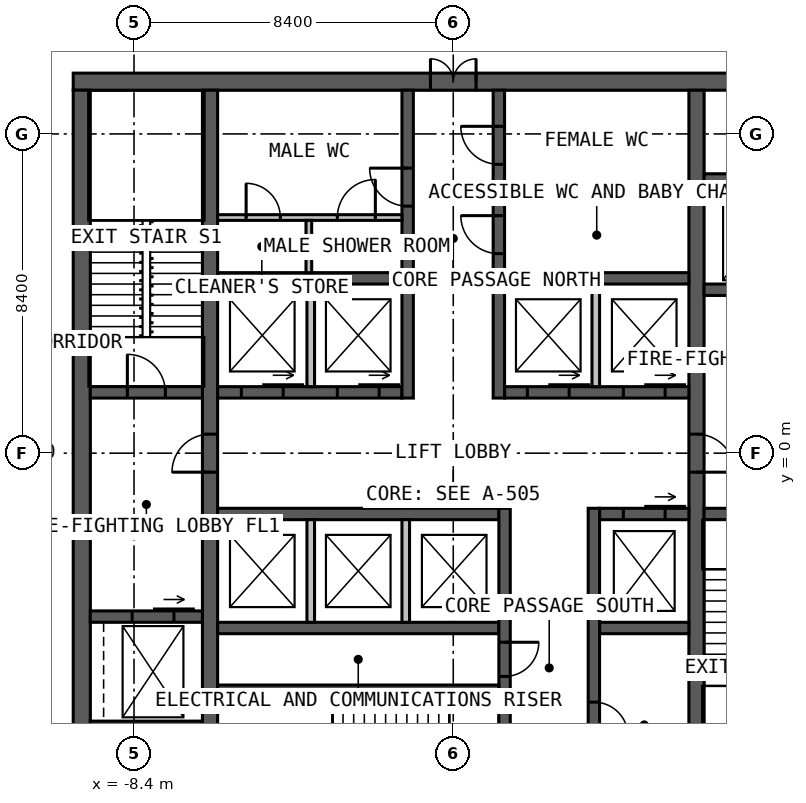
"""IFC4 building model, lengths in metres.
Left out: names, types, materials, properties, quantities, classifications, styles, units other than length and angle.
Written with IfcOpenShell. Run it as: python <this file> out.ifc"""

import sys

from ifc_helpers import new_model, si_unit, direction, frame, frame_2d, origin, place, context, subcontext, project, spatial, rectangle, extrude, element, fill, save


model = new_model("IFC4")
c1 = context("Model", 3, precision=1e-05, world=origin(), true_north=direction((0.0, 1.0)))
c2 = subcontext(c1, "Body", "Model", "MODEL_VIEW")
j1 = project(units=[si_unit("LENGTHUNIT", "METRE"), si_unit("PLANEANGLEUNIT", "RADIAN")], contexts=[c1])
p1 = place(None, origin())
s1 = spatial("IfcSite", under=j1, at=p1, CompositionType="ELEMENT")
p2 = place(p1, origin())
s2 = spatial("IfcBuilding", under=s1, at=p2, CompositionType="ELEMENT")
p3 = place(p2, frame((0.0, 0.0, 203.0)))
s3 = spatial("IfcBuildingStorey", under=s2, at=p3, CompositionType="ELEMENT", Elevation=203.0)
p4 = place(p3, frame((-10.0, 9.775, 0.0), z_axis=(0.0, 0.0, 1.0), x_axis=(1.0, 0.0, 0.0)))
e1 = element("IfcWall", 1, at=p4, inside=s3, PredefinedType="SOLIDWALL", context=c2, shape_type="SweptSolid", body=[
    extrude(rectangle(XDim=20.0, YDim=0.45, at=frame_2d((10.0, 0.0))), origin(), (0.0, 0.0, 1.0), 4.0),
])
p5 = place(p4, frame((9.4, 0.0, 0.0)))
e2 = element("IfcOpeningElement", 2, at=p5, cuts=e1, PredefinedType="OPENING", context=c2, shape_type="SweptSolid", body=[
    extrude(rectangle(XDim=1.2, YDim=2.2, at=frame_2d((0.6, 1.1))), frame((0.0, 0.235, 0.0), z_axis=(0.0, -1.0, 0.0), x_axis=(1.0, 0.0, 0.0)), (0.0, 0.0, 1.0), 0.47),
])
p6 = place(p3, frame((-9.775, 9.55, 0.0), z_axis=(0.0, 0.0, 1.0), x_axis=(0.0, -1.0, 0.0)))
e3 = element("IfcWall", 3, at=p6, inside=s3, PredefinedType="SOLIDWALL", context=c2, shape_type="SweptSolid", body=[
    extrude(rectangle(XDim=19.1, YDim=0.45, at=frame_2d((9.55, 0.0))), origin(), (0.0, 0.0, 1.0), 4.0),
])
p7 = place(p3, frame((-6.4, -9.55, 0.0), z_axis=(0.0, 0.0, 1.0), x_axis=(0.0, 1.0, 0.0)))
e4 = element("IfcWall", 4, at=p7, inside=s3, PredefinedType="SOLIDWALL", context=c2, shape_type="SweptSolid", body=[
    extrude(rectangle(XDim=19.1, YDim=0.4, at=frame_2d((9.55, 0.0))), origin(), (0.0, 0.0, 1.0), 4.0),
])
p8 = place(p7, frame((9.05, 0.0, 0.0)))
e5 = element("IfcOpeningElement", 5, at=p8, cuts=e4, PredefinedType="OPENING", context=c2, shape_type="SweptSolid", body=[
    extrude(rectangle(XDim=1.0, YDim=2.2, at=frame_2d((0.5, 1.1))), frame((0.0, 0.21, 0.0), z_axis=(0.0, -1.0, 0.0), x_axis=(1.0, 0.0, 0.0)), (0.0, 0.0, 1.0), 0.42),
])
p9 = place(p3, frame((6.4, 9.55, 0.0), z_axis=(0.0, 0.0, 1.0), x_axis=(0.0, -1.0, 0.0)))
e6 = element("IfcWall", 6, at=p9, inside=s3, PredefinedType="SOLIDWALL", context=c2, shape_type="SweptSolid", body=[
    extrude(rectangle(XDim=19.1, YDim=0.4, at=frame_2d((9.55, 0.0))), origin(), (0.0, 0.0, 1.0), 4.0),
])
p10 = place(p9, frame((9.05, 0.0, 0.0)))
e7 = element("IfcOpeningElement", 7, at=p10, cuts=e6, PredefinedType="OPENING", context=c2, shape_type="SweptSolid", body=[
    extrude(rectangle(XDim=1.0, YDim=2.2, at=frame_2d((0.5, 1.1))), frame((0.0, 0.21, 0.0), z_axis=(0.0, -1.0, 0.0), x_axis=(1.0, 0.0, 0.0)), (0.0, 0.0, 1.0), 0.42),
])
p11 = place(p3, frame((-6.2, 1.6, 0.0), z_axis=(0.0, 0.0, 1.0), x_axis=(1.0, 0.0, 0.0)))
e8 = element("IfcWall", 8, at=p11, inside=s3, PredefinedType="SOLIDWALL", context=c2, shape_type="SweptSolid", body=[
    extrude(rectangle(XDim=4.85, YDim=0.3, at=frame_2d((2.425, 0.0))), origin(), (0.0, 0.0, 1.0), 4.0),
])
p12 = place(p11, frame((0.625, 0.0, 0.0)))
e9 = element("IfcOpeningElement", 9, at=p12, cuts=e8, PredefinedType="OPENING", context=c2, shape_type="SweptSolid", body=[
    extrude(rectangle(XDim=1.1, YDim=2.2, at=frame_2d((0.55, 1.1))), frame((0.0, 0.16, 0.0), z_axis=(0.0, -1.0, 0.0), x_axis=(1.0, 0.0, 0.0)), (0.0, 0.0, 1.0), 0.32),
])
p13 = place(p11, frame((3.15, 0.0, 0.0)))
e10 = element("IfcOpeningElement", 10, at=p13, cuts=e8, PredefinedType="OPENING", context=c2, shape_type="SweptSolid", body=[
    extrude(rectangle(XDim=1.1, YDim=2.2, at=frame_2d((0.55, 1.1))), frame((0.0, 0.16, 0.0), z_axis=(0.0, -1.0, 0.0), x_axis=(1.0, 0.0, 0.0)), (0.0, 0.0, 1.0), 0.32),
])
p14 = place(p3, frame((1.35, 1.6, 0.0), z_axis=(0.0, 0.0, 1.0), x_axis=(1.0, 0.0, 0.0)))
e11 = element("IfcWall", 11, at=p14, inside=s3, PredefinedType="SOLIDWALL", context=c2, shape_type="SweptSolid", body=[
    extrude(rectangle(XDim=4.85, YDim=0.3, at=frame_2d((2.425, 0.0))), origin(), (0.0, 0.0, 1.0), 4.0),
])
p15 = place(p14, frame((0.6, 0.0, 0.0)))
e12 = element("IfcOpeningElement", 12, at=p15, cuts=e11, PredefinedType="OPENING", context=c2, shape_type="SweptSolid", body=[
    extrude(rectangle(XDim=1.1, YDim=2.2, at=frame_2d((0.55, 1.1))), frame((0.0, 0.16, 0.0), z_axis=(0.0, -1.0, 0.0), x_axis=(1.0, 0.0, 0.0)), (0.0, 0.0, 1.0), 0.32),
])
p16 = place(p14, frame((3.125, 0.0, 0.0)))
e13 = element("IfcOpeningElement", 13, at=p16, cuts=e11, PredefinedType="OPENING", context=c2, shape_type="SweptSolid", body=[
    extrude(rectangle(XDim=1.1, YDim=2.2, at=frame_2d((0.55, 1.1))), frame((0.0, 0.16, 0.0), z_axis=(0.0, -1.0, 0.0), x_axis=(1.0, 0.0, 0.0)), (0.0, 0.0, 1.0), 0.32),
])
for number, where, z_axis, x_axis in (
    (14, (-6.2, 4.6, 0.0), (0.0, 0.0, 1.0), (1.0, 0.0, 0.0)),
    (15, (1.35, 4.6, 0.0), (0.0, 0.0, 1.0), (1.0, 0.0, 0.0)),
):
    element("IfcWall", number, at=place(p3, frame(where, z_axis=z_axis, x_axis=x_axis)), inside=s3, PredefinedType="SOLIDWALL", context=c2, shape_type="SweptSolid", body=[
        extrude(rectangle(XDim=4.85, YDim=0.3, at=frame_2d((2.425, 0.0))), origin(), (0.0, 0.0, 1.0), 4.0),
    ])
p17 = place(p3, frame((-1.2, 1.45, 0.0), z_axis=(0.0, 0.0, 1.0), x_axis=(0.0, 1.0, 0.0)))
e16 = element("IfcWall", 16, at=p17, inside=s3, PredefinedType="SOLIDWALL", context=c2, shape_type="SweptSolid", body=[
    extrude(rectangle(XDim=8.1, YDim=0.3, at=frame_2d((4.05, 0.0))), origin(), (0.0, 0.0, 1.0), 4.0),
])
p18 = place(p17, frame((5.05, 0.0, 0.0)))
e17 = element("IfcOpeningElement", 17, at=p18, cuts=e16, PredefinedType="OPENING", context=c2, shape_type="SweptSolid", body=[
    extrude(rectangle(XDim=1.0, YDim=2.2, at=frame_2d((0.5, 1.1))), frame((0.0, 0.16, 0.0), z_axis=(0.0, -1.0, 0.0), x_axis=(1.0, 0.0, 0.0)), (0.0, 0.0, 1.0), 0.32),
])
p19 = place(p3, frame((1.2, 1.45, 0.0), z_axis=(0.0, 0.0, 1.0), x_axis=(0.0, 1.0, 0.0)))
e18 = element("IfcWall", 18, at=p19, inside=s3, PredefinedType="SOLIDWALL", context=c2, shape_type="SweptSolid", body=[
    extrude(rectangle(XDim=8.1, YDim=0.3, at=frame_2d((4.05, 0.0))), origin(), (0.0, 0.0, 1.0), 4.0),
])
p20 = place(p19, frame((3.8, 0.0, 0.0)))
e19 = element("IfcOpeningElement", 19, at=p20, cuts=e18, PredefinedType="OPENING", context=c2, shape_type="SweptSolid", body=[
    extrude(rectangle(XDim=1.0, YDim=2.2, at=frame_2d((0.5, 1.1))), frame((0.0, 0.16, 0.0), z_axis=(0.0, -1.0, 0.0), x_axis=(1.0, 0.0, 0.0)), (0.0, 0.0, 1.0), 0.32),
])
p21 = place(p19, frame((6.15, 0.0, 0.0)))
e20 = element("IfcOpeningElement", 20, at=p21, cuts=e18, PredefinedType="OPENING", context=c2, shape_type="SweptSolid", body=[
    extrude(rectangle(XDim=1.0, YDim=2.2, at=frame_2d((0.5, 1.1))), frame((0.0, 0.16, 0.0), z_axis=(0.0, -1.0, 0.0), x_axis=(1.0, 0.0, 0.0)), (0.0, 0.0, 1.0), 0.32),
])
p22 = place(p3, frame((-6.2, -1.6, 0.0), z_axis=(0.0, 0.0, 1.0), x_axis=(1.0, 0.0, 0.0)))
e21 = element("IfcWall", 21, at=p22, inside=s3, PredefinedType="SOLIDWALL", context=c2, shape_type="SweptSolid", body=[
    extrude(rectangle(XDim=7.4, YDim=0.3, at=frame_2d((3.7, 0.0))), origin(), (0.0, 0.0, 1.0), 4.0),
])
p23 = place(p3, frame((3.85, -1.6, 0.0), z_axis=(0.0, 0.0, 1.0), x_axis=(1.0, 0.0, 0.0)))
e22 = element("IfcWall", 22, at=p23, inside=s3, PredefinedType="SOLIDWALL", context=c2, shape_type="SweptSolid", body=[
    extrude(rectangle(XDim=2.35, YDim=0.3, at=frame_2d((1.175, 0.0))), origin(), (0.0, 0.0, 1.0), 4.0),
])
p24 = place(p23, frame((0.625, 0.0, 0.0)))
e23 = element("IfcOpeningElement", 23, at=p24, cuts=e22, PredefinedType="OPENING", context=c2, shape_type="SweptSolid", body=[
    extrude(rectangle(XDim=1.1, YDim=2.2, at=frame_2d((0.55, 1.1))), frame((0.0, 0.16, 0.0), z_axis=(0.0, -1.0, 0.0), x_axis=(1.0, 0.0, 0.0)), (0.0, 0.0, 1.0), 0.32),
])
p25 = place(p3, frame((-6.2, -4.6, 0.0), z_axis=(0.0, 0.0, 1.0), x_axis=(1.0, 0.0, 0.0)))
e24 = element("IfcWall", 24, at=p25, inside=s3, PredefinedType="SOLIDWALL", context=c2, shape_type="SweptSolid", body=[
    extrude(rectangle(XDim=7.4, YDim=0.3, at=frame_2d((3.7, 0.0))), origin(), (0.0, 0.0, 1.0), 4.0),
])
p26 = place(p3, frame((3.85, -4.6, 0.0), z_axis=(0.0, 0.0, 1.0), x_axis=(1.0, 0.0, 0.0)))
e25 = element("IfcWall", 25, at=p26, inside=s3, PredefinedType="SOLIDWALL", context=c2, shape_type="SweptSolid", body=[
    extrude(rectangle(XDim=2.35, YDim=0.3, at=frame_2d((1.175, 0.0))), origin(), (0.0, 0.0, 1.0), 4.0),
])
p27 = place(p3, frame((1.35, -1.45, 0.0), z_axis=(0.0, 0.0, 1.0), x_axis=(0.0, -1.0, 0.0)))
e26 = element("IfcWall", 26, at=p27, inside=s3, PredefinedType="SOLIDWALL", context=c2, shape_type="SweptSolid", body=[
    extrude(rectangle(XDim=8.1, YDim=0.3, at=frame_2d((4.05, 0.0))), origin(), (0.0, 0.0, 1.0), 4.0),
])
p28 = place(p27, frame((5.975, 0.0, 0.0)))
e27 = element("IfcOpeningElement", 27, at=p28, cuts=e26, PredefinedType="OPENING", context=c2, shape_type="SweptSolid", body=[
    extrude(rectangle(XDim=1.0, YDim=2.2, at=frame_2d((0.5, 1.1))), frame((0.0, 0.16, 0.0), z_axis=(0.0, -1.0, 0.0), x_axis=(1.0, 0.0, 0.0)), (0.0, 0.0, 1.0), 0.32),
])
p29 = place(p27, frame((3.525, 0.0, 0.0)))
e28 = element("IfcOpeningElement", 28, at=p29, cuts=e26, PredefinedType="OPENING", context=c2, shape_type="SweptSolid", body=[
    extrude(rectangle(XDim=0.9, YDim=2.2, at=frame_2d((0.45, 1.1))), frame((0.0, 0.16, 0.0), z_axis=(0.0, -1.0, 0.0), x_axis=(1.0, 0.0, 0.0)), (0.0, 0.0, 1.0), 0.32),
])
p30 = place(p3, frame((3.7, -1.45, 0.0), z_axis=(0.0, 0.0, 1.0), x_axis=(0.0, -1.0, 0.0)))
e29 = element("IfcWall", 29, at=p30, inside=s3, PredefinedType="SOLIDWALL", context=c2, shape_type="SweptSolid", body=[
    extrude(rectangle(XDim=8.1, YDim=0.3, at=frame_2d((4.05, 0.0))), origin(), (0.0, 0.0, 1.0), 4.0),
])
p31 = place(p30, frame((5.1, 0.0, 0.0)))
e30 = element("IfcOpeningElement", 30, at=p31, cuts=e29, PredefinedType="OPENING", context=c2, shape_type="SweptSolid", body=[
    extrude(rectangle(XDim=0.9, YDim=2.2, at=frame_2d((0.45, 1.1))), frame((0.0, 0.16, 0.0), z_axis=(0.0, -1.0, 0.0), x_axis=(1.0, 0.0, 0.0)), (0.0, 0.0, 1.0), 0.32),
])
p32 = place(p3, frame((-6.2, -6.2, 0.0), z_axis=(0.0, 0.0, 1.0), x_axis=(1.0, 0.0, 0.0)))
e31 = element("IfcWall", 31, at=p32, inside=s3, PredefinedType="SOLIDWALL", context=c2, shape_type="SweptSolid", body=[
    extrude(rectangle(XDim=7.4, YDim=0.2, at=frame_2d((3.7, 0.0))), origin(), (0.0, 0.0, 1.0), 4.0),
])
p33 = place(p3, frame((-9.55, 1.6, 0.0), z_axis=(0.0, 0.0, 1.0), x_axis=(1.0, 0.0, 0.0)))
e32 = element("IfcWall", 32, at=p33, inside=s3, PredefinedType="SOLIDWALL", context=c2, shape_type="SweptSolid", body=[
    extrude(rectangle(XDim=2.95, YDim=0.3, at=frame_2d((1.475, 0.0))), origin(), (0.0, 0.0, 1.0), 4.0),
])
p34 = place(p33, frame((0.975, 0.0, 0.0)))
e33 = element("IfcOpeningElement", 33, at=p34, cuts=e32, PredefinedType="OPENING", context=c2, shape_type="SweptSolid", body=[
    extrude(rectangle(XDim=1.0, YDim=2.2, at=frame_2d((0.5, 1.1))), frame((0.0, 0.16, 0.0), z_axis=(0.0, -1.0, 0.0), x_axis=(1.0, 0.0, 0.0)), (0.0, 0.0, 1.0), 0.32),
])
p35 = place(p3, frame((6.6, -1.6, 0.0), z_axis=(0.0, 0.0, 1.0), x_axis=(1.0, 0.0, 0.0)))
e34 = element("IfcWall", 34, at=p35, inside=s3, PredefinedType="SOLIDWALL", context=c2, shape_type="SweptSolid", body=[
    extrude(rectangle(XDim=2.95, YDim=0.3, at=frame_2d((1.475, 0.0))), origin(), (0.0, 0.0, 1.0), 4.0),
])
p36 = place(p35, frame((0.975, 0.0, 0.0)))
e35 = element("IfcOpeningElement", 35, at=p36, cuts=e34, PredefinedType="OPENING", context=c2, shape_type="SweptSolid", body=[
    extrude(rectangle(XDim=1.0, YDim=2.2, at=frame_2d((0.5, 1.1))), frame((0.0, 0.16, 0.0), z_axis=(0.0, -1.0, 0.0), x_axis=(1.0, 0.0, 0.0)), (0.0, 0.0, 1.0), 0.32),
])
p37 = place(p3, frame((-9.55, -4.3, 0.0), z_axis=(0.0, 0.0, 1.0), x_axis=(1.0, 0.0, 0.0)))
e36 = element("IfcWall", 36, at=p37, inside=s3, PredefinedType="SOLIDWALL", context=c2, shape_type="SweptSolid", body=[
    extrude(rectangle(XDim=2.95, YDim=0.3, at=frame_2d((1.475, 0.0))), origin(), (0.0, 0.0, 1.0), 4.0),
])
p38 = place(p37, frame((1.1, 0.0, 0.0)))
e37 = element("IfcOpeningElement", 37, at=p38, cuts=e36, PredefinedType="OPENING", context=c2, shape_type="SweptSolid", body=[
    extrude(rectangle(XDim=1.1, YDim=2.2, at=frame_2d((0.55, 1.1))), frame((0.0, 0.16, 0.0), z_axis=(0.0, -1.0, 0.0), x_axis=(1.0, 0.0, 0.0)), (0.0, 0.0, 1.0), 0.32),
])
p39 = place(p3, frame((6.6, 4.3, 0.0), z_axis=(0.0, 0.0, 1.0), x_axis=(1.0, 0.0, 0.0)))
e38 = element("IfcWall", 38, at=p39, inside=s3, PredefinedType="SOLIDWALL", context=c2, shape_type="SweptSolid", body=[
    extrude(rectangle(XDim=2.95, YDim=0.3, at=frame_2d((1.475, 0.0))), origin(), (0.0, 0.0, 1.0), 4.0),
])
p40 = place(p39, frame((0.75, 0.0, 0.0)))
e39 = element("IfcOpeningElement", 39, at=p40, cuts=e38, PredefinedType="OPENING", context=c2, shape_type="SweptSolid", body=[
    extrude(rectangle(XDim=1.1, YDim=2.2, at=frame_2d((0.55, 1.1))), frame((0.0, 0.16, 0.0), z_axis=(0.0, -1.0, 0.0), x_axis=(1.0, 0.0, 0.0)), (0.0, 0.0, 1.0), 0.32),
])
for number, where, z_axis, x_axis in (
    (40, (-9.55, -7.2, 0.0), (0.0, 0.0, 1.0), (1.0, 0.0, 0.0)),
    (41, (6.6, 7.2, 0.0), (0.0, 0.0, 1.0), (1.0, 0.0, 0.0)),
):
    element("IfcWall", number, at=place(p3, frame(where, z_axis=z_axis, x_axis=x_axis)), inside=s3, PredefinedType="SOLIDWALL", context=c2, shape_type="SweptSolid", body=[
        extrude(rectangle(XDim=2.95, YDim=0.3, at=frame_2d((1.475, 0.0))), origin(), (0.0, 0.0, 1.0), 4.0),
    ])
for number, where, z_axis, x_axis in (
    (42, (-3.75, 1.75, 0.0), (0.0, 0.0, 1.0), (0.0, 1.0, 0.0)),
    (43, (3.75, 1.75, 0.0), (0.0, 0.0, 1.0), (0.0, 1.0, 0.0)),
    (44, (-3.75, -1.75, 0.0), (0.0, 0.0, 1.0), (0.0, -1.0, 0.0)),
    (45, (-1.25, -1.75, 0.0), (0.0, 0.0, 1.0), (0.0, -1.0, 0.0)),
):
    element("IfcWall", number, at=place(p3, frame(where, z_axis=z_axis, x_axis=x_axis)), inside=s3, PredefinedType="SOLIDWALL", context=c2, shape_type="SweptSolid", body=[
        extrude(rectangle(XDim=2.7, YDim=0.2, at=frame_2d((1.35, 0.0))), origin(), (0.0, 0.0, 1.0), 3.75),
    ])
p41 = place(p3, frame((1.35, 6.8, 0.0), z_axis=(0.0, 0.0, 1.0), x_axis=(1.0, 0.0, 0.0)))
e46 = element("IfcWall", 46, at=p41, inside=s3, PredefinedType="PARTITIONING", context=c2, shape_type="SweptSolid", body=[
    extrude(rectangle(XDim=4.85, YDim=0.15, at=frame_2d((2.425, 0.0))), origin(), (0.0, 0.0, 1.0), 3.75),
])
p42 = place(p3, frame((-6.2, 6.2, 0.0), z_axis=(0.0, 0.0, 1.0), x_axis=(1.0, 0.0, 0.0)))
e47 = element("IfcWall", 47, at=p42, inside=s3, PredefinedType="PARTITIONING", context=c2, shape_type="SweptSolid", body=[
    extrude(rectangle(XDim=4.85, YDim=0.15, at=frame_2d((2.425, 0.0))), origin(), (0.0, 0.0, 1.0), 3.75),
])
p43 = place(p42, frame((3.15, 0.0, 0.0)))
e48 = element("IfcOpeningElement", 48, at=p43, cuts=e47, PredefinedType="OPENING", context=c2, shape_type="SweptSolid", body=[
    extrude(rectangle(XDim=1.0, YDim=2.2, at=frame_2d((0.5, 1.1))), frame((0.0, 0.085, 0.0), z_axis=(0.0, -1.0, 0.0), x_axis=(1.0, 0.0, 0.0)), (0.0, 0.0, 1.0), 0.17),
])
p44 = place(p42, frame((0.75, 0.0, 0.0)))
e49 = element("IfcOpeningElement", 49, at=p44, cuts=e47, PredefinedType="OPENING", context=c2, shape_type="SweptSolid", body=[
    extrude(rectangle(XDim=0.9, YDim=2.2, at=frame_2d((0.45, 1.1))), frame((0.0, 0.085, 0.0), z_axis=(0.0, -1.0, 0.0), x_axis=(1.0, 0.0, 0.0)), (0.0, 0.0, 1.0), 0.17),
])
p45 = place(p3, frame((-3.8, 4.75, 0.0), z_axis=(0.0, 0.0, 1.0), x_axis=(0.0, 1.0, 0.0)))
e50 = element("IfcWall", 50, at=p45, inside=s3, PredefinedType="PARTITIONING", context=c2, shape_type="SweptSolid", body=[
    extrude(rectangle(XDim=1.375, YDim=0.15, at=frame_2d((0.688, 0.0))), origin(), (0.0, 0.0, 1.0), 3.75),
])
p46 = place(p5, origin())
e51 = element("IfcDoor", 51, at=p46, inside=s3, OperationType="DOUBLE_DOOR_SINGLE_SWING", PredefinedType="DOOR", context=c2, shape_type="SweptSolid", body=[
    extrude(rectangle(XDim=1.2, YDim=2.2, at=frame_2d((0.6, 1.1))), frame((0.0, 0.025, 0.0), z_axis=(0.0, -1.0, 0.0), x_axis=(1.0, 0.0, 0.0)), (0.0, 0.0, 1.0), 0.05),
])
fill(e2, e51)
p47 = place(p8, origin())
e52 = element("IfcDoor", 52, at=p47, inside=s3, OperationType="SINGLE_SWING_LEFT", PredefinedType="DOOR", context=c2, shape_type="SweptSolid", body=[
    extrude(rectangle(XDim=1.0, YDim=2.2, at=frame_2d((0.5, 1.1))), frame((0.0, 0.025, 0.0), z_axis=(0.0, -1.0, 0.0), x_axis=(1.0, 0.0, 0.0)), (0.0, 0.0, 1.0), 0.05),
])
fill(e5, e52)
p48 = place(p10, origin())
e53 = element("IfcDoor", 53, at=p48, inside=s3, OperationType="SINGLE_SWING_RIGHT", PredefinedType="DOOR", context=c2, shape_type="SweptSolid", body=[
    extrude(rectangle(XDim=1.0, YDim=2.2, at=frame_2d((0.5, 1.1))), frame((0.0, 0.025, 0.0), z_axis=(0.0, -1.0, 0.0), x_axis=(1.0, 0.0, 0.0)), (0.0, 0.0, 1.0), 0.05),
])
fill(e7, e53)
p49 = place(p34, origin())
e54 = element("IfcDoor", 54, at=p49, inside=s3, OperationType="SINGLE_SWING_LEFT", PredefinedType="DOOR", context=c2, shape_type="SweptSolid", body=[
    extrude(rectangle(XDim=1.0, YDim=2.2, at=frame_2d((0.5, 1.1))), frame((0.0, 0.025, 0.0), z_axis=(0.0, -1.0, 0.0), x_axis=(1.0, 0.0, 0.0)), (0.0, 0.0, 1.0), 0.05),
])
fill(e33, e54)
p50 = place(p18, origin())
e55 = element("IfcDoor", 55, at=p50, inside=s3, OperationType="SINGLE_SWING_RIGHT", PredefinedType="DOOR", context=c2, shape_type="SweptSolid", body=[
    extrude(rectangle(XDim=1.0, YDim=2.2, at=frame_2d((0.5, 1.1))), frame((0.0, 0.025, 0.0), z_axis=(0.0, -1.0, 0.0), x_axis=(1.0, 0.0, 0.0)), (0.0, 0.0, 1.0), 0.05),
])
fill(e17, e55)
p51 = place(p20, origin())
e56 = element("IfcDoor", 56, at=p51, inside=s3, OperationType="SINGLE_SWING_RIGHT", PredefinedType="DOOR", context=c2, shape_type="SweptSolid", body=[
    extrude(rectangle(XDim=1.0, YDim=2.2, at=frame_2d((0.5, 1.1))), frame((0.0, 0.025, 0.0), z_axis=(0.0, -1.0, 0.0), x_axis=(1.0, 0.0, 0.0)), (0.0, 0.0, 1.0), 0.05),
])
fill(e19, e56)
p52 = place(p21, origin())
e57 = element("IfcDoor", 57, at=p52, inside=s3, OperationType="SINGLE_SWING_RIGHT", PredefinedType="DOOR", context=c2, shape_type="SweptSolid", body=[
    extrude(rectangle(XDim=1.0, YDim=2.2, at=frame_2d((0.5, 1.1))), frame((0.0, 0.025, 0.0), z_axis=(0.0, -1.0, 0.0), x_axis=(1.0, 0.0, 0.0)), (0.0, 0.0, 1.0), 0.05),
])
fill(e20, e57)
p53 = place(p29, origin())
e58 = element("IfcDoor", 58, at=p53, inside=s3, OperationType="SINGLE_SWING_LEFT", PredefinedType="DOOR", context=c2, shape_type="SweptSolid", body=[
    extrude(rectangle(XDim=0.9, YDim=2.2, at=frame_2d((0.45, 1.1))), frame((0.0, 0.025, 0.0), z_axis=(0.0, -1.0, 0.0), x_axis=(1.0, 0.0, 0.0)), (0.0, 0.0, 1.0), 0.05),
])
fill(e28, e58)
p54 = place(p31, origin())
e59 = element("IfcDoor", 59, at=p54, inside=s3, OperationType="SINGLE_SWING_RIGHT", PredefinedType="DOOR", context=c2, shape_type="SweptSolid", body=[
    extrude(rectangle(XDim=0.9, YDim=2.2, at=frame_2d((0.45, 1.1))), frame((0.0, 0.025, 0.0), z_axis=(0.0, -1.0, 0.0), x_axis=(1.0, 0.0, 0.0)), (0.0, 0.0, 1.0), 0.05),
])
fill(e30, e59)
p55 = place(p43, origin())
e60 = element("IfcDoor", 60, at=p55, inside=s3, OperationType="SINGLE_SWING_RIGHT", PredefinedType="DOOR", context=c2, shape_type="SweptSolid", body=[
    extrude(rectangle(XDim=1.0, YDim=2.2, at=frame_2d((0.5, 1.1))), frame((0.0, 0.025, 0.0), z_axis=(0.0, -1.0, 0.0), x_axis=(1.0, 0.0, 0.0)), (0.0, 0.0, 1.0), 0.05),
])
fill(e48, e60)
p56 = place(p44, origin())
e61 = element("IfcDoor", 61, at=p56, inside=s3, OperationType="SINGLE_SWING_LEFT", PredefinedType="DOOR", context=c2, shape_type="SweptSolid", body=[
    extrude(rectangle(XDim=0.9, YDim=2.2, at=frame_2d((0.45, 1.1))), frame((0.0, 0.025, 0.0), z_axis=(0.0, -1.0, 0.0), x_axis=(1.0, 0.0, 0.0)), (0.0, 0.0, 1.0), 0.05),
])
fill(e49, e61)
p57 = place(p12, origin())
e62 = element("IfcDoor", 62, at=p57, inside=s3, OperationType="SLIDING_TO_LEFT", PredefinedType="DOOR", context=c2, shape_type="SweptSolid", body=[
    extrude(rectangle(XDim=1.1, YDim=2.2, at=frame_2d((0.55, 1.1))), frame((0.0, 0.025, 0.0), z_axis=(0.0, -1.0, 0.0), x_axis=(1.0, 0.0, 0.0)), (0.0, 0.0, 1.0), 0.05),
])
fill(e9, e62)
p58 = place(p13, origin())
e63 = element("IfcDoor", 63, at=p58, inside=s3, OperationType="SLIDING_TO_LEFT", PredefinedType="DOOR", context=c2, shape_type="SweptSolid", body=[
    extrude(rectangle(XDim=1.1, YDim=2.2, at=frame_2d((0.55, 1.1))), frame((0.0, 0.025, 0.0), z_axis=(0.0, -1.0, 0.0), x_axis=(1.0, 0.0, 0.0)), (0.0, 0.0, 1.0), 0.05),
])
fill(e10, e63)
p59 = place(p15, origin())
e64 = element("IfcDoor", 64, at=p59, inside=s3, OperationType="SLIDING_TO_LEFT", PredefinedType="DOOR", context=c2, shape_type="SweptSolid", body=[
    extrude(rectangle(XDim=1.1, YDim=2.2, at=frame_2d((0.55, 1.1))), frame((0.0, 0.025, 0.0), z_axis=(0.0, -1.0, 0.0), x_axis=(1.0, 0.0, 0.0)), (0.0, 0.0, 1.0), 0.05),
])
fill(e12, e64)
p60 = place(p16, origin())
e65 = element("IfcDoor", 65, at=p60, inside=s3, OperationType="SLIDING_TO_LEFT", PredefinedType="DOOR", context=c2, shape_type="SweptSolid", body=[
    extrude(rectangle(XDim=1.1, YDim=2.2, at=frame_2d((0.55, 1.1))), frame((0.0, 0.025, 0.0), z_axis=(0.0, -1.0, 0.0), x_axis=(1.0, 0.0, 0.0)), (0.0, 0.0, 1.0), 0.05),
])
fill(e13, e65)
p61 = place(p24, origin())
e66 = element("IfcDoor", 66, at=p61, inside=s3, OperationType="SLIDING_TO_LEFT", PredefinedType="DOOR", context=c2, shape_type="SweptSolid", body=[
    extrude(rectangle(XDim=1.1, YDim=2.2, at=frame_2d((0.55, 1.1))), frame((0.0, 0.025, 0.0), z_axis=(0.0, -1.0, 0.0), x_axis=(1.0, 0.0, 0.0)), (0.0, 0.0, 1.0), 0.05),
])
fill(e23, e66)
p62 = place(p38, origin())
e67 = element("IfcDoor", 67, at=p62, inside=s3, OperationType="SLIDING_TO_LEFT", PredefinedType="DOOR", context=c2, shape_type="SweptSolid", body=[
    extrude(rectangle(XDim=1.1, YDim=2.2, at=frame_2d((0.55, 1.1))), frame((0.0, 0.025, 0.0), z_axis=(0.0, -1.0, 0.0), x_axis=(1.0, 0.0, 0.0)), (0.0, 0.0, 1.0), 0.05),
])
fill(e37, e67)
save(model, sys.argv[1])
